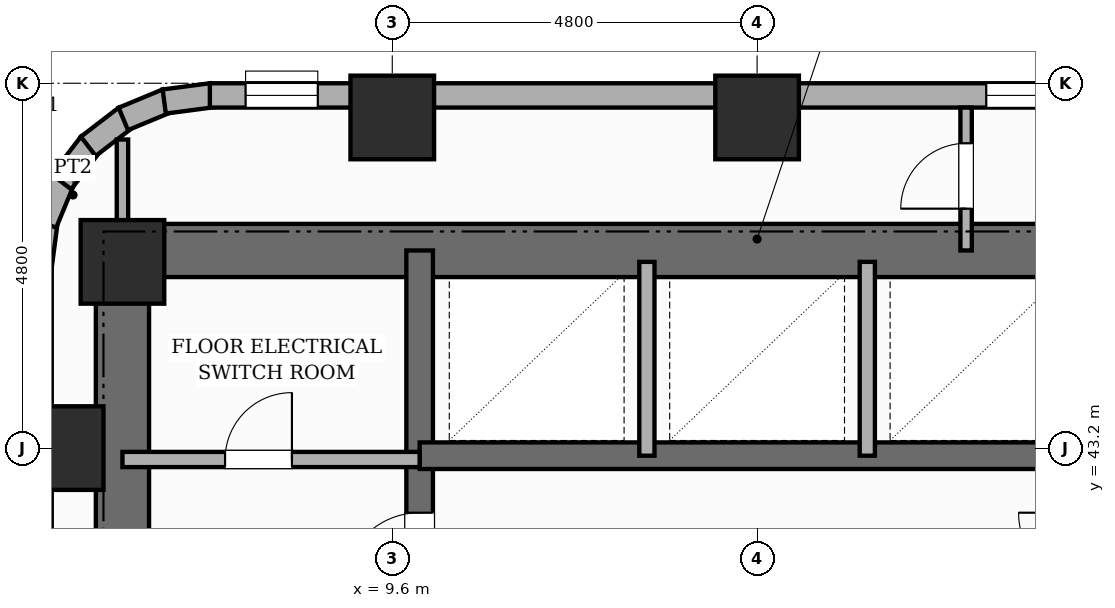
"""IFC4 building model, lengths in metres.
Left out: names, types, materials, properties, quantities, classifications, styles, units other than length and angle.
Written with IfcOpenShell. Run it as: python <this file> out.ifc"""

import sys

from ifc_helpers import new_model, si_unit, direction, frame, frame_2d, origin, origin_2d, place, context, subcontext, project, spatial, rectangle, extrude, element, fill, save


model = new_model("IFC4")
c1 = context("Model", 3, precision=1e-05, world=origin(), true_north=direction((0.0, 1.0)))
c2 = subcontext(c1, "Body", "Model", "MODEL_VIEW")
j1 = project(units=[si_unit("LENGTHUNIT", "METRE"), si_unit("PLANEANGLEUNIT", "RADIAN")], contexts=[c1])
p1 = place(None, origin())
s1 = spatial("IfcSite", under=j1, at=p1, CompositionType="ELEMENT")
p2 = place(p1, origin())
s2 = spatial("IfcBuilding", under=s1, at=p2, CompositionType="ELEMENT")
p3 = place(p2, frame((0.0, 0.0, 68.2)))
s3 = spatial("IfcBuildingStorey", under=s2, at=p3, CompositionType="ELEMENT", Elevation=68.2)
p4 = place(p3, frame((6.05, 30.55, 0.0), z_axis=(0.0, 0.0, 1.0), x_axis=(0.0, 1.0, 0.0)))
e1 = element("IfcWall", 1, at=p4, inside=s3, PredefinedType="SHEAR", context=c2, shape_type="SweptSolid", body=[
    extrude(rectangle(XDim=15.6, YDim=0.7, at=frame_2d((7.8, 0.0))), origin(), (0.0, 0.0, 1.0), 3.6),
])
p5 = place(p3, frame((6.05, 45.8, 0.0), z_axis=(0.0, 0.0, 1.0), x_axis=(1.0, 0.0, 0.0)))
e2 = element("IfcWall", 2, at=p5, inside=s3, PredefinedType="SHEAR", context=c2, shape_type="SweptSolid", body=[
    extrude(rectangle(XDim=16.7, YDim=0.7, at=frame_2d((8.35, 0.0))), origin(), (0.0, 0.0, 1.0), 3.6),
])
p6 = place(p3, frame((9.96, 30.9, 0.0), z_axis=(0.0, 0.0, 1.0), x_axis=(0.0, 1.0, 0.0)))
e3 = element("IfcWall", 3, at=p6, inside=s3, PredefinedType="SHEAR", context=c2, shape_type="SweptSolid", body=[
    extrude(rectangle(XDim=14.9, YDim=0.35, at=frame_2d((7.45, 0.0))), origin(), (0.0, 0.0, 1.0), 3.6),
])
p7 = place(p6, frame((0.65, 0.0, 0.0)))
e4 = element("IfcOpeningElement", 4, at=p7, cuts=e3, PredefinedType="OPENING", context=c2, shape_type="SweptSolid", body=[
    extrude(rectangle(XDim=0.95, YDim=2.1, at=frame_2d((0.475, 1.05))), frame((0.0, 0.185, 0.0), z_axis=(0.0, -1.0, 0.0), x_axis=(1.0, 0.0, 0.0)), (0.0, 0.0, 1.0), 0.37),
])
p8 = place(p6, frame((10.45, 0.0, 0.0)))
e5 = element("IfcOpeningElement", 5, at=p8, cuts=e3, PredefinedType="OPENING", context=c2, shape_type="SweptSolid", body=[
    extrude(rectangle(XDim=1.0, YDim=2.15, at=frame_2d((0.5, 1.075))), frame((0.0, 0.185, 0.0), z_axis=(0.0, -1.0, 0.0), x_axis=(1.0, 0.0, 0.0)), (0.0, 0.0, 1.0), 0.37),
])
p9 = place(p3, frame((9.96, 43.1, 0.0), z_axis=(0.0, 0.0, 1.0), x_axis=(1.0, 0.0, 0.0)))
e6 = element("IfcWall", 6, at=p9, inside=s3, PredefinedType="SHEAR", context=c2, shape_type="SweptSolid", body=[
    extrude(rectangle(XDim=8.88, YDim=0.35, at=frame_2d((4.44, 0.0))), origin(), (0.0, 0.0, 1.0), 3.6),
])
for number, where, z_axis, x_axis in (
    (7, (5.25, 43.2, 0.0), (0.0, 0.0, 1.0), (1.0, 0.0, 0.0)),
    (8, (6.05, 45.65, 0.0), (0.0, 0.0, 1.0), (1.0, 0.0, 0.0)),
    (9, (9.6, 47.55, 0.0), (0.0, 0.0, 1.0), (1.0, 0.0, 0.0)),
    (10, (14.4, 47.55, 0.0), (0.0, 0.0, 1.0), (1.0, 0.0, 0.0)),
):
    element("IfcColumn", number, at=place(p3, frame(where, z_axis=z_axis, x_axis=x_axis)), inside=s3, PredefinedType="COLUMN", context=c2, shape_type="SweptSolid", body=[
        extrude(rectangle(XDim=1.1, YDim=1.1, at=origin_2d()), origin(), (0.0, 0.0, 1.0), 3.6),
    ])
for number, where, z_axis, x_axis in (
    (11, (4.958, 45.579, 0.0), (0.0, 0.0, 1.0), (0.131, 0.991, 0.0)),
    (12, (5.03, 46.16, 0.0), (0.0, 0.0, 1.0), (0.383, 0.924, 0.0)),
):
    element("IfcWall", number, at=place(p3, frame(where, z_axis=z_axis, x_axis=x_axis)), inside=s3, PredefinedType="STANDARD", context=c2, shape_type="SweptSolid", body=[
        extrude(rectangle(XDim=0.626, YDim=0.32, at=frame_2d((0.313, 0.0))), origin(), (0.0, 0.0, 1.0), 3.35),
    ])
p10 = place(p3, frame((5.248, 46.703, 0.0), z_axis=(0.0, 0.0, 1.0), x_axis=(0.608938521285, 0.7932174212, 0.0)))
e13 = element("IfcWall", 13, at=p10, inside=s3, PredefinedType="STANDARD", context=c2, shape_type="SweptSolid", body=[
    extrude(rectangle(XDim=0.627, YDim=0.32, at=frame_2d((0.313, 0.0))), origin(), (0.0, 0.0, 1.0), 3.35),
])
p11 = place(p3, frame((5.6, 47.17, 0.0), z_axis=(0.0, 0.0, 1.0), x_axis=(0.793405610854, 0.608693302629, 0.0)))
e14 = element("IfcWall", 14, at=p11, inside=s3, PredefinedType="STANDARD", context=c2, shape_type="SweptSolid", body=[
    extrude(rectangle(XDim=0.626, YDim=0.32, at=frame_2d((0.313, 0.0))), origin(), (0.0, 0.0, 1.0), 3.35),
])
p12 = place(p3, frame((6.061, 47.531, 0.0), z_axis=(0.0, 0.0, 1.0), x_axis=(0.923836271867, 0.382787856107, 0.0)))
e15 = element("IfcWall", 15, at=p12, inside=s3, PredefinedType="STANDARD", context=c2, shape_type="SweptSolid", body=[
    extrude(rectangle(XDim=0.626, YDim=0.32, at=frame_2d((0.313, 0.0))), origin(), (0.0, 0.0, 1.0), 3.35),
])
p13 = place(p3, frame((6.6, 47.76, 0.0), z_axis=(0.0, 0.0, 1.0), x_axis=(0.991447664465, 0.130504898859, 0.0)))
e16 = element("IfcWall", 16, at=p13, inside=s3, PredefinedType="STANDARD", context=c2, shape_type="SweptSolid", body=[
    extrude(rectangle(XDim=0.627, YDim=0.32, at=frame_2d((0.313, 0.0))), origin(), (0.0, 0.0, 1.0), 3.35),
])
p14 = place(p3, frame((7.2, 47.84, 0.0), z_axis=(0.0, 0.0, 1.0), x_axis=(1.0, 0.0, 0.0)))
e17 = element("IfcWall", 17, at=p14, inside=s3, PredefinedType="STANDARD", context=c2, shape_type="SweptSolid", body=[
    extrude(rectangle(XDim=48.0, YDim=0.32, at=frame_2d((24.0, 0.0))), origin(), (0.0, 0.0, 1.0), 2.53),
])
p15 = place(p14, frame((28.803, 0.0, 0.65)))
e18 = element("IfcOpeningElement", 18, at=p15, cuts=e17, PredefinedType="OPENING", context=c2, shape_type="SweptSolid", body=[
    extrude(rectangle(XDim=1.4, YDim=1.1, at=frame_2d((0.7, 0.55))), frame((0.0, 0.17, 0.0), z_axis=(0.0, -1.0, 0.0), x_axis=(1.0, 0.0, 0.0)), (0.0, 0.0, 1.0), 0.34),
])
p16 = place(p14, frame((47.094, 0.0, 0.45)))
e19 = element("IfcOpeningElement", 19, at=p16, cuts=e17, PredefinedType="OPENING", context=c2, shape_type="SweptSolid", body=[
    extrude(rectangle(XDim=0.6, YDim=1.8, at=frame_2d((0.3, 0.9))), frame((0.0, 0.17, 0.0), z_axis=(0.0, -1.0, 0.0), x_axis=(1.0, 0.0, 0.0)), (0.0, 0.0, 1.0), 0.34),
])
p17 = place(p14, frame((18.74, 0.0, 0.45)))
e20 = element("IfcOpeningElement", 20, at=p17, cuts=e17, PredefinedType="OPENING", context=c2, shape_type="SweptSolid", body=[
    extrude(rectangle(XDim=0.95, YDim=1.8, at=frame_2d((0.475, 0.9))), frame((0.0, 0.17, 0.0), z_axis=(0.0, -1.0, 0.0), x_axis=(1.0, 0.0, 0.0)), (0.0, 0.0, 1.0), 0.34),
])
p18 = place(p14, frame((41.65, 0.0, 0.45)))
e21 = element("IfcOpeningElement", 21, at=p18, cuts=e17, PredefinedType="OPENING", context=c2, shape_type="SweptSolid", body=[
    extrude(rectangle(XDim=0.75, YDim=1.8, at=frame_2d((0.375, 0.9))), frame((0.0, 0.17, 0.0), z_axis=(0.0, -1.0, 0.0), x_axis=(1.0, 0.0, 0.0)), (0.0, 0.0, 1.0), 0.34),
])
p19 = place(p14, frame((37.736, 0.0, 0.65)))
e22 = element("IfcOpeningElement", 22, at=p19, cuts=e17, PredefinedType="OPENING", context=c2, shape_type="SweptSolid", body=[
    extrude(rectangle(XDim=1.4, YDim=1.1, at=frame_2d((0.7, 0.55))), frame((0.0, 0.17, 0.0), z_axis=(0.0, -1.0, 0.0), x_axis=(1.0, 0.0, 0.0)), (0.0, 0.0, 1.0), 0.34),
])
p20 = place(p14, frame((0.47, 0.0, 0.45)))
e23 = element("IfcOpeningElement", 23, at=p20, cuts=e17, PredefinedType="OPENING", context=c2, shape_type="SweptSolid", body=[
    extrude(rectangle(XDim=0.95, YDim=1.8, at=frame_2d((0.475, 0.9))), frame((0.0, 0.17, 0.0), z_axis=(0.0, -1.0, 0.0), x_axis=(1.0, 0.0, 0.0)), (0.0, 0.0, 1.0), 0.34),
])
p21 = place(p14, frame((10.215, 0.0, 0.45)))
e24 = element("IfcOpeningElement", 24, at=p21, cuts=e17, PredefinedType="OPENING", context=c2, shape_type="SweptSolid", body=[
    extrude(rectangle(XDim=0.95, YDim=1.8, at=frame_2d((0.475, 0.9))), frame((0.0, 0.17, 0.0), z_axis=(0.0, -1.0, 0.0), x_axis=(1.0, 0.0, 0.0)), (0.0, 0.0, 1.0), 0.34),
])
p22 = place(p14, frame((23.43, 0.0, 0.65)))
e25 = element("IfcOpeningElement", 25, at=p22, cuts=e17, PredefinedType="OPENING", context=c2, shape_type="SweptSolid", body=[
    extrude(rectangle(XDim=1.4, YDim=1.1, at=frame_2d((0.7, 0.55))), frame((0.0, 0.17, 0.0), z_axis=(0.0, -1.0, 0.0), x_axis=(1.0, 0.0, 0.0)), (0.0, 0.0, 1.0), 0.34),
])
p23 = place(p14, frame((42.95, 0.0, 0.65)))
e26 = element("IfcOpeningElement", 26, at=p23, cuts=e17, PredefinedType="OPENING", context=c2, shape_type="SweptSolid", body=[
    extrude(rectangle(XDim=1.4, YDim=1.1, at=frame_2d((0.7, 0.55))), frame((0.0, 0.17, 0.0), z_axis=(0.0, -1.0, 0.0), x_axis=(1.0, 0.0, 0.0)), (0.0, 0.0, 1.0), 0.34),
])
p24 = place(p14, frame((45.984, 0.0, 0.45)))
e27 = element("IfcOpeningElement", 27, at=p24, cuts=e17, PredefinedType="OPENING", context=c2, shape_type="SweptSolid", body=[
    extrude(rectangle(XDim=0.6, YDim=1.8, at=frame_2d((0.3, 0.9))), frame((0.0, 0.17, 0.0), z_axis=(0.0, -1.0, 0.0), x_axis=(1.0, 0.0, 0.0)), (0.0, 0.0, 1.0), 0.34),
])
p25 = place(p3, frame((6.05, 43.05, 0.0), z_axis=(0.0, 0.0, 1.0), x_axis=(1.0, 0.0, 0.0)))
e28 = element("IfcWall", 28, at=p25, inside=s3, PredefinedType="POLYGONAL", context=c2, shape_type="SweptSolid", body=[
    extrude(rectangle(XDim=3.91, YDim=0.2, at=frame_2d((1.955, 0.0))), origin(), (0.0, 0.0, 1.0), 2.53),
])
p26 = place(p25, frame((1.35, 0.0, 0.0)))
e29 = element("IfcOpeningElement", 29, at=p26, cuts=e28, PredefinedType="OPENING", context=c2, shape_type="SweptSolid", body=[
    extrude(rectangle(XDim=0.88, YDim=2.1, at=frame_2d((0.44, 1.05))), frame((0.0, 0.11, 0.0), z_axis=(0.0, -1.0, 0.0), x_axis=(1.0, 0.0, 0.0)), (0.0, 0.0, 1.0), 0.22),
])
for number, where, z_axis, x_axis in (
    (30, (12.95, 43.1, 0.0), (0.0, 0.0, 1.0), (0.0, 1.0, 0.0)),
    (31, (15.85, 43.1, 0.0), (0.0, 0.0, 1.0), (0.0, 1.0, 0.0)),
):
    element("IfcWall", number, at=place(p3, frame(where, z_axis=z_axis, x_axis=x_axis)), inside=s3, PredefinedType="POLYGONAL", context=c2, shape_type="SweptSolid", body=[
        extrude(rectangle(XDim=2.55, YDim=0.2, at=frame_2d((1.275, 0.0))), origin(), (0.0, 0.0, 1.0), 3.35),
    ])
p27 = place(p3, frame((6.05, 45.8, 0.0), z_axis=(0.0, 0.0, 1.0), x_axis=(0.0, 1.0, 0.0)))
e32 = element("IfcWall", 32, at=p27, inside=s3, PredefinedType="PARTITIONING", context=c2, shape_type="SweptSolid", body=[
    extrude(rectangle(XDim=1.46, YDim=0.15, at=frame_2d((0.73, 0.0))), origin(), (0.0, 0.0, 1.0), 3.35),
])
p28 = place(p3, frame((17.15, 45.8, 0.0), z_axis=(0.0, 0.0, 1.0), x_axis=(0.0, 1.0, 0.0)))
e33 = element("IfcWall", 33, at=p28, inside=s3, PredefinedType="PARTITIONING", context=c2, shape_type="SweptSolid", body=[
    extrude(rectangle(XDim=1.88, YDim=0.15, at=frame_2d((0.94, 0.0))), origin(), (0.0, 0.0, 1.0), 3.35),
])
p29 = place(p28, frame((0.55, 0.0, 0.0)))
e34 = element("IfcOpeningElement", 34, at=p29, cuts=e33, PredefinedType="OPENING", context=c2, shape_type="SweptSolid", body=[
    extrude(rectangle(XDim=0.86, YDim=2.1, at=frame_2d((0.43, 1.05))), frame((0.0, 0.085, 0.0), z_axis=(0.0, -1.0, 0.0), x_axis=(1.0, 0.0, 0.0)), (0.0, 0.0, 1.0), 0.17),
])
p30 = place(p20, origin())
e35 = element("IfcWindow", 35, at=p30, inside=s3, PartitioningType="SINGLE_PANEL", PredefinedType="WINDOW", context=c2, shape_type="SweptSolid", body=[
    extrude(rectangle(XDim=0.95, YDim=1.8, at=frame_2d((0.475, 0.9))), frame((0.0, 0.03, 0.0), z_axis=(0.0, -1.0, 0.0), x_axis=(1.0, 0.0, 0.0)), (0.0, 0.0, 1.0), 0.06),
])
fill(e23, e35)
p31 = place(p21, origin())
e36 = element("IfcWindow", 36, at=p31, inside=s3, PartitioningType="SINGLE_PANEL", PredefinedType="WINDOW", context=c2, shape_type="SweptSolid", body=[
    extrude(rectangle(XDim=0.95, YDim=1.8, at=frame_2d((0.475, 0.9))), frame((0.0, 0.03, 0.0), z_axis=(0.0, -1.0, 0.0), x_axis=(1.0, 0.0, 0.0)), (0.0, 0.0, 1.0), 0.06),
])
fill(e24, e36)
p32 = place(p8, origin())
e37 = element("IfcDoor", 37, at=p32, inside=s3, OperationType="SINGLE_SWING_LEFT", PredefinedType="DOOR", context=c2, shape_type="SweptSolid", body=[
    extrude(rectangle(XDim=1.0, YDim=2.15, at=frame_2d((0.5, 1.075))), frame((0.0, 0.025, 0.0), z_axis=(0.0, -1.0, 0.0), x_axis=(1.0, 0.0, 0.0)), (0.0, 0.0, 1.0), 0.05),
])
fill(e5, e37)
p33 = place(p26, origin())
e38 = element("IfcDoor", 38, at=p33, inside=s3, OperationType="SINGLE_SWING_RIGHT", PredefinedType="DOOR", context=c2, shape_type="SweptSolid", body=[
    extrude(rectangle(XDim=0.88, YDim=2.1, at=frame_2d((0.44, 1.05))), frame((0.0, 0.025, 0.0), z_axis=(0.0, -1.0, 0.0), x_axis=(1.0, 0.0, 0.0)), (0.0, 0.0, 1.0), 0.05),
])
fill(e29, e38)
p34 = place(p29, origin())
e39 = element("IfcDoor", 39, at=p34, inside=s3, OperationType="SINGLE_SWING_LEFT", PredefinedType="DOOR", context=c2, shape_type="SweptSolid", body=[
    extrude(rectangle(XDim=0.86, YDim=2.1, at=frame_2d((0.43, 1.05))), frame((0.0, 0.025, 0.0), z_axis=(0.0, -1.0, 0.0), x_axis=(1.0, 0.0, 0.0)), (0.0, 0.0, 1.0), 0.05),
])
fill(e34, e39)
save(model, sys.argv[1])
